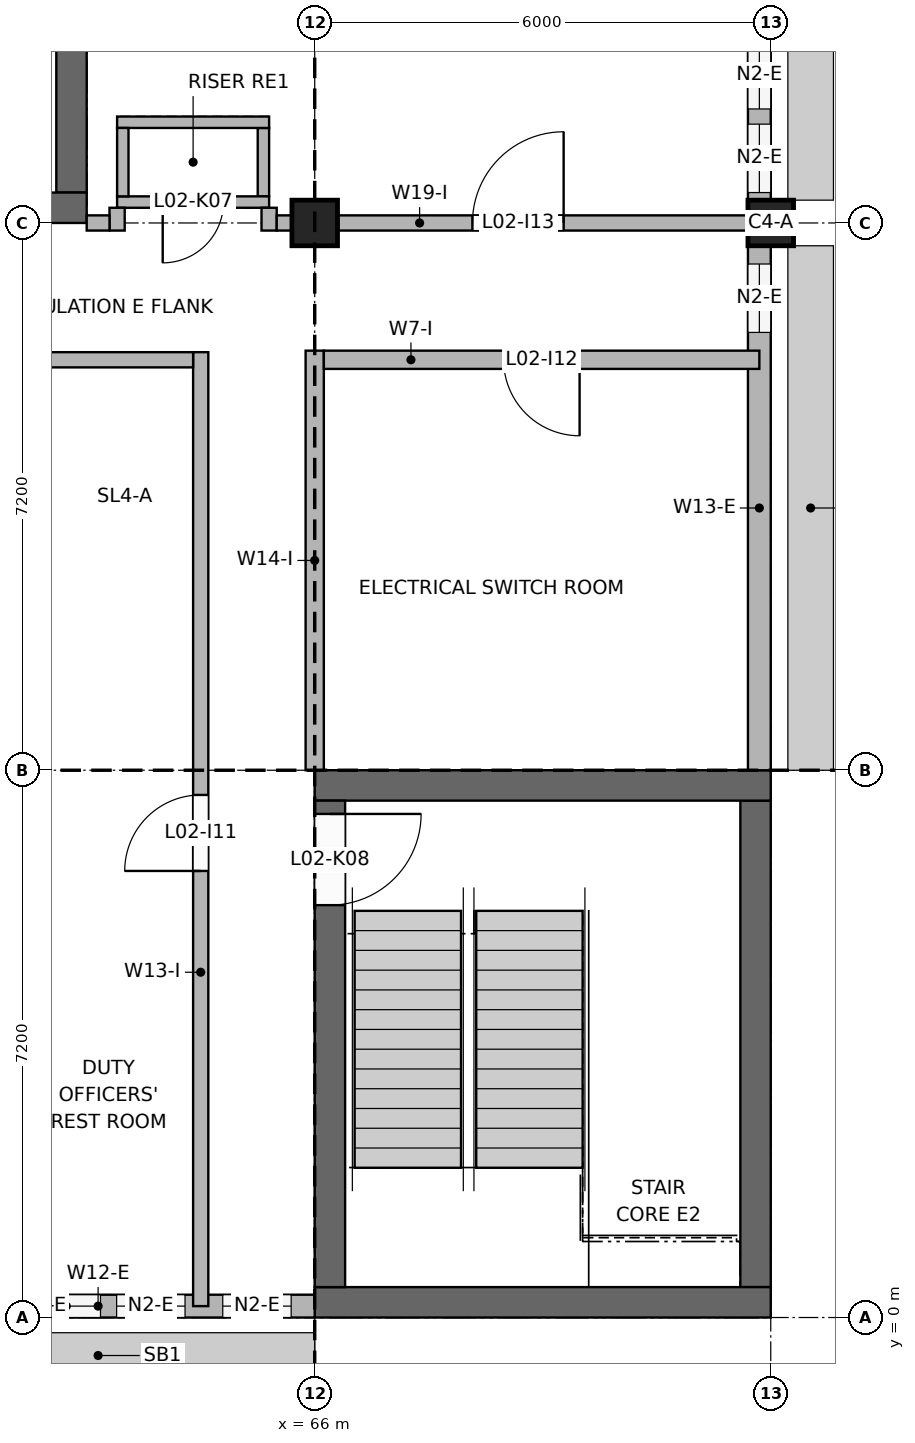
"""IFC4 building model, lengths in metres.
Left out: names, types, materials, properties, quantities, classifications, styles, units other than length and angle.
Written with IfcOpenShell. Run it as: python <this file> out.ifc"""

import sys

from ifc_helpers import new_model, si_unit, direction, frame, frame_2d, origin, origin_2d, place, context, subcontext, project, spatial, rectangle, extrude, element, fill, save


model = new_model("IFC4")
c1 = context("Model", 3, precision=1e-05, world=origin(), true_north=direction((0.0, 1.0)))
c2 = subcontext(c1, "Body", "Model", "MODEL_VIEW")
j1 = project(units=[si_unit("LENGTHUNIT", "METRE"), si_unit("PLANEANGLEUNIT", "RADIAN")], contexts=[c1])
p1 = place(None, origin())
s1 = spatial("IfcSite", under=j1, at=p1, CompositionType="ELEMENT")
p2 = place(p1, origin())
s2 = spatial("IfcBuilding", under=s1, at=p2, CompositionType="ELEMENT")
p3 = place(p2, frame((0.0, 0.0, 8.4)))
s3 = spatial("IfcBuildingStorey", under=s2, at=p3, CompositionType="ELEMENT", Elevation=8.4)
p4 = place(p3, frame((60.0, 14.6, 0.0), z_axis=(0.0, 0.0, 1.0), x_axis=(1.0, 0.0, 0.0)))
e1 = element("IfcWall", 1, at=p4, inside=s3, PredefinedType="SHEAR", context=c2, shape_type="SweptSolid", body=[
    extrude(rectangle(XDim=3.0, YDim=0.4, at=frame_2d((1.5, 0.0))), origin(), (0.0, 0.0, 1.0), 5.75),
])
p5 = place(p4, frame((0.95, 0.0, 0.0)))
e2 = element("IfcOpeningElement", 2, at=p5, cuts=e1, PredefinedType="OPENING", context=c2, shape_type="SweptSolid", body=[
    extrude(rectangle(XDim=1.1, YDim=2.1, at=frame_2d((0.55, 1.05))), frame((0.0, 0.21, 0.0), z_axis=(0.0, -1.0, 0.0), x_axis=(1.0, 0.0, 0.0)), (0.0, 0.0, 1.0), 0.42),
])
p6 = place(p3, frame((62.8, 14.8, 0.0), z_axis=(0.0, 0.0, 1.0), x_axis=(0.0, 1.0, 0.0)))
e3 = element("IfcWall", 3, at=p6, inside=s3, PredefinedType="SHEAR", context=c2, shape_type="SweptSolid", body=[
    extrude(rectangle(XDim=2.8, YDim=0.4, at=frame_2d((1.4, 0.0))), origin(), (0.0, 0.0, 1.0), 5.75),
])
for number, where, z_axis, x_axis in (
    (4, (66.0, 0.2, 0.0), (0.0, 0.0, 1.0), (1.0, 0.0, 0.0)),
    (5, (66.0, 7.0, 0.0), (0.0, 0.0, 1.0), (1.0, 0.0, 0.0)),
):
    element("IfcWall", number, at=place(p3, frame(where, z_axis=z_axis, x_axis=x_axis)), inside=s3, PredefinedType="SHEAR", context=c2, shape_type="SweptSolid", body=[
        extrude(rectangle(XDim=6.0, YDim=0.4, at=frame_2d((3.0, 0.0))), origin(), (0.0, 0.0, 1.0), 3.95),
    ])
p7 = place(p3, frame((66.2, 0.4, 0.0), z_axis=(0.0, 0.0, 1.0), x_axis=(0.0, 1.0, 0.0)))
e6 = element("IfcWall", 6, at=p7, inside=s3, PredefinedType="SHEAR", context=c2, shape_type="SweptSolid", body=[
    extrude(rectangle(XDim=6.4, YDim=0.4, at=frame_2d((3.2, 0.0))), origin(), (0.0, 0.0, 1.0), 3.95),
])
p8 = place(p7, frame((5.025, 0.0, 0.0)))
e7 = element("IfcOpeningElement", 7, at=p8, cuts=e6, PredefinedType="OPENING", context=c2, shape_type="SweptSolid", body=[
    extrude(rectangle(XDim=1.2, YDim=2.1, at=frame_2d((0.6, 1.05))), frame((0.0, 0.21, 0.0), z_axis=(0.0, -1.0, 0.0), x_axis=(1.0, 0.0, 0.0)), (0.0, 0.0, 1.0), 0.42),
])
p9 = place(p3, frame((71.8, 0.4, 0.0), z_axis=(0.0, 0.0, 1.0), x_axis=(0.0, 1.0, 0.0)))
e8 = element("IfcWall", 8, at=p9, inside=s3, PredefinedType="SHEAR", context=c2, shape_type="SweptSolid", body=[
    extrude(rectangle(XDim=6.4, YDim=0.4, at=frame_2d((3.2, 0.0))), origin(), (0.0, 0.0, 1.0), 3.95),
])
p10 = place(p3, frame((63.4, 14.675, 0.0), z_axis=(0.0, 0.0, 1.0), x_axis=(1.0, 0.0, 0.0)))
e9 = element("IfcWall", 9, at=p10, inside=s3, PredefinedType="SOLIDWALL", context=c2, shape_type="SweptSolid", body=[
    extrude(rectangle(XDim=2.0, YDim=0.15, at=frame_2d((1.0, 0.0))), origin(), (0.0, 0.0, 1.0), 3.95),
])
p11 = place(p10, frame((0.6, 0.0, 0.0)))
e10 = element("IfcOpeningElement", 10, at=p11, cuts=e9, PredefinedType="OPENING", context=c2, shape_type="SweptSolid", body=[
    extrude(rectangle(XDim=0.8, YDim=2.1, at=frame_2d((0.4, 1.05))), frame((0.0, 0.085, 0.0), z_axis=(0.0, -1.0, 0.0), x_axis=(1.0, 0.0, 0.0)), (0.0, 0.0, 1.0), 0.17),
])
p12 = place(p3, frame((63.4, 15.725, 0.0), z_axis=(0.0, 0.0, 1.0), x_axis=(1.0, 0.0, 0.0)))
e11 = element("IfcWall", 11, at=p12, inside=s3, PredefinedType="SOLIDWALL", context=c2, shape_type="SweptSolid", body=[
    extrude(rectangle(XDim=2.0, YDim=0.15, at=frame_2d((1.0, 0.0))), origin(), (0.0, 0.0, 1.0), 3.95),
])
for number, where, z_axis, x_axis in (
    (12, (63.475, 14.75, 0.0), (0.0, 0.0, 1.0), (0.0, 1.0, 0.0)),
    (13, (65.325, 14.75, 0.0), (0.0, 0.0, 1.0), (0.0, 1.0, 0.0)),
):
    element("IfcWall", number, at=place(p3, frame(where, z_axis=z_axis, x_axis=x_axis)), inside=s3, PredefinedType="SOLIDWALL", context=c2, shape_type="SweptSolid", body=[
        extrude(rectangle(XDim=0.9, YDim=0.15, at=frame_2d((0.45, 0.0))), origin(), (0.0, 0.0, 1.0), 3.95),
    ])
for number, where, z_axis, x_axis in (
    (14, (66.0, 14.4, 0.0), (0.0, 0.0, 1.0), (1.0, 0.0, 0.0)),
    (15, (72.0, 14.4, 0.0), (0.0, 0.0, 1.0), (1.0, 0.0, 0.0)),
):
    element("IfcColumn", number, at=place(p3, frame(where, z_axis=z_axis, x_axis=x_axis)), inside=s3, PredefinedType="COLUMN", context=c2, shape_type="SweptSolid", body=[
        extrude(rectangle(XDim=0.6, YDim=0.6, at=origin_2d()), origin(), (0.0, 0.0, 1.0), 3.95),
    ])
p13 = place(p3, frame((60.3, 0.15, 0.0), z_axis=(0.0, 0.0, 1.0), x_axis=(1.0, 0.0, 0.0)))
e16 = element("IfcWall", 16, at=p13, inside=s3, PredefinedType="SOLIDWALL", context=c2, shape_type="SweptSolid", body=[
    extrude(rectangle(XDim=5.7, YDim=0.3, at=frame_2d((2.85, 0.0))), origin(), (0.0, 0.0, 1.0), 3.15),
])
p14 = place(p13, frame((0.413, 0.0, 0.9)))
e17 = element("IfcOpeningElement", 17, at=p14, cuts=e16, PredefinedType="OPENING", context=c2, shape_type="SweptSolid", body=[
    extrude(rectangle(XDim=0.9, YDim=1.2, at=frame_2d((0.45, 0.6))), frame((0.0, 0.16, 0.0), z_axis=(0.0, -1.0, 0.0), x_axis=(1.0, 0.0, 0.0)), (0.0, 0.0, 1.0), 0.32),
])
p15 = place(p13, frame((1.981, 0.0, 0.9)))
e18 = element("IfcOpeningElement", 18, at=p15, cuts=e16, PredefinedType="OPENING", context=c2, shape_type="SweptSolid", body=[
    extrude(rectangle(XDim=0.9, YDim=1.2, at=frame_2d((0.45, 0.6))), frame((0.0, 0.16, 0.0), z_axis=(0.0, -1.0, 0.0), x_axis=(1.0, 0.0, 0.0)), (0.0, 0.0, 1.0), 0.32),
])
p16 = place(p13, frame((3.094, 0.0, 0.9)))
e19 = element("IfcOpeningElement", 19, at=p16, cuts=e16, PredefinedType="OPENING", context=c2, shape_type="SweptSolid", body=[
    extrude(rectangle(XDim=0.9, YDim=1.2, at=frame_2d((0.45, 0.6))), frame((0.0, 0.16, 0.0), z_axis=(0.0, -1.0, 0.0), x_axis=(1.0, 0.0, 0.0)), (0.0, 0.0, 1.0), 0.32),
])
p17 = place(p13, frame((4.49, 0.0, 0.9)))
e20 = element("IfcOpeningElement", 20, at=p17, cuts=e16, PredefinedType="OPENING", context=c2, shape_type="SweptSolid", body=[
    extrude(rectangle(XDim=0.9, YDim=1.2, at=frame_2d((0.45, 0.6))), frame((0.0, 0.16, 0.0), z_axis=(0.0, -1.0, 0.0), x_axis=(1.0, 0.0, 0.0)), (0.0, 0.0, 1.0), 0.32),
])
p18 = place(p3, frame((71.85, 7.2, 0.0), z_axis=(0.0, 0.0, 1.0), x_axis=(0.0, 1.0, 0.0)))
e21 = element("IfcWall", 21, at=p18, inside=s3, PredefinedType="SOLIDWALL", context=c2, shape_type="SweptSolid", body=[
    extrude(rectangle(XDim=6.9, YDim=0.3, at=frame_2d((3.45, 0.0))), origin(), (0.0, 0.0, 1.0), 3.05),
])
p19 = place(p18, frame((5.76, 0.0, 0.9)))
e22 = element("IfcOpeningElement", 22, at=p19, cuts=e21, PredefinedType="OPENING", context=c2, shape_type="SweptSolid", body=[
    extrude(rectangle(XDim=0.9, YDim=1.2, at=frame_2d((0.45, 0.6))), frame((0.0, 0.16, 0.0), z_axis=(0.0, -1.0, 0.0), x_axis=(1.0, 0.0, 0.0)), (0.0, 0.0, 1.0), 0.32),
])
p20 = place(p3, frame((71.85, 14.7, 0.0), z_axis=(0.0, 0.0, 1.0), x_axis=(0.0, 1.0, 0.0)))
e23 = element("IfcWall", 23, at=p20, inside=s3, PredefinedType="SOLIDWALL", context=c2, shape_type="SweptSolid", body=[
    extrude(rectangle(XDim=6.6, YDim=0.3, at=frame_2d((3.3, 0.0))), origin(), (0.0, 0.0, 1.0), 3.05),
])
p21 = place(p20, frame((0.1, 0.0, 0.9)))
e24 = element("IfcOpeningElement", 24, at=p21, cuts=e23, PredefinedType="OPENING", context=c2, shape_type="SweptSolid", body=[
    extrude(rectangle(XDim=0.9, YDim=1.2, at=frame_2d((0.45, 0.6))), frame((0.0, 0.16, 0.0), z_axis=(0.0, -1.0, 0.0), x_axis=(1.0, 0.0, 0.0)), (0.0, 0.0, 1.0), 0.32),
])
p22 = place(p20, frame((1.2, 0.0, 0.9)))
e25 = element("IfcOpeningElement", 25, at=p22, cuts=e23, PredefinedType="OPENING", context=c2, shape_type="SweptSolid", body=[
    extrude(rectangle(XDim=0.9, YDim=1.2, at=frame_2d((0.45, 0.6))), frame((0.0, 0.16, 0.0), z_axis=(0.0, -1.0, 0.0), x_axis=(1.0, 0.0, 0.0)), (0.0, 0.0, 1.0), 0.32),
])
p23 = place(p20, frame((2.3, 0.0, 0.9)))
e26 = element("IfcOpeningElement", 26, at=p23, cuts=e23, PredefinedType="OPENING", context=c2, shape_type="SweptSolid", body=[
    extrude(rectangle(XDim=0.9, YDim=1.2, at=frame_2d((0.45, 0.6))), frame((0.0, 0.16, 0.0), z_axis=(0.0, -1.0, 0.0), x_axis=(1.0, 0.0, 0.0)), (0.0, 0.0, 1.0), 0.32),
])
p24 = place(p20, frame((3.4, 0.0, 0.9)))
e27 = element("IfcOpeningElement", 27, at=p24, cuts=e23, PredefinedType="OPENING", context=c2, shape_type="SweptSolid", body=[
    extrude(rectangle(XDim=0.9, YDim=1.2, at=frame_2d((0.45, 0.6))), frame((0.0, 0.16, 0.0), z_axis=(0.0, -1.0, 0.0), x_axis=(1.0, 0.0, 0.0)), (0.0, 0.0, 1.0), 0.32),
])
p25 = place(p20, frame((4.5, 0.0, 0.9)))
e28 = element("IfcOpeningElement", 28, at=p25, cuts=e23, PredefinedType="OPENING", context=c2, shape_type="SweptSolid", body=[
    extrude(rectangle(XDim=0.9, YDim=1.2, at=frame_2d((0.45, 0.6))), frame((0.0, 0.16, 0.0), z_axis=(0.0, -1.0, 0.0), x_axis=(1.0, 0.0, 0.0)), (0.0, 0.0, 1.0), 0.32),
])
p26 = place(p20, frame((5.6, 0.0, 0.9)))
e29 = element("IfcOpeningElement", 29, at=p26, cuts=e23, PredefinedType="OPENING", context=c2, shape_type="SweptSolid", body=[
    extrude(rectangle(XDim=0.9, YDim=1.2, at=frame_2d((0.45, 0.6))), frame((0.0, 0.16, 0.0), z_axis=(0.0, -1.0, 0.0), x_axis=(1.0, 0.0, 0.0)), (0.0, 0.0, 1.0), 0.32),
])
p27 = place(p3, frame((63.4, 14.3, 0.0), z_axis=(0.0, 0.0, 1.0), x_axis=(0.0, 1.0, 0.0)))
e30 = element("IfcWall", 30, at=p27, inside=s3, PredefinedType="PARTITIONING", context=c2, shape_type="SweptSolid", body=[
    extrude(rectangle(XDim=0.3, YDim=0.2, at=frame_2d((0.15, 0.0))), origin(), (0.0, 0.0, 1.0), 3.25),
])
p28 = place(p3, frame((64.5, 0.15, 0.0), z_axis=(0.0, 0.0, 1.0), x_axis=(0.0, 1.0, 0.0)))
e31 = element("IfcWall", 31, at=p28, inside=s3, PredefinedType="PARTITIONING", context=c2, shape_type="SweptSolid", body=[
    extrude(rectangle(XDim=12.55, YDim=0.2, at=frame_2d((6.275, 0.0))), origin(), (0.0, 0.0, 1.0), 3.15),
])
p29 = place(p28, frame((5.725, 0.0, 0.0)))
e32 = element("IfcOpeningElement", 32, at=p29, cuts=e31, PredefinedType="OPENING", context=c2, shape_type="SweptSolid", body=[
    extrude(rectangle(XDim=1.0, YDim=2.1, at=frame_2d((0.5, 1.05))), frame((0.0, 0.11, 0.0), z_axis=(0.0, -1.0, 0.0), x_axis=(1.0, 0.0, 0.0)), (0.0, 0.0, 1.0), 0.22),
])
p30 = place(p3, frame((65.4, 14.3, 0.0), z_axis=(0.0, 0.0, 1.0), x_axis=(0.0, 1.0, 0.0)))
e33 = element("IfcWall", 33, at=p30, inside=s3, PredefinedType="PARTITIONING", context=c2, shape_type="SweptSolid", body=[
    extrude(rectangle(XDim=0.3, YDim=0.2, at=frame_2d((0.15, 0.0))), origin(), (0.0, 0.0, 1.0), 3.25),
])
p31 = place(p3, frame((66.0, 7.2, 0.0), z_axis=(0.0, 0.0, 1.0), x_axis=(0.0, 1.0, 0.0)))
e34 = element("IfcWall", 34, at=p31, inside=s3, PredefinedType="PARTITIONING", context=c2, shape_type="SweptSolid", body=[
    extrude(rectangle(XDim=5.52, YDim=0.24, at=frame_2d((2.76, 0.0))), origin(), (0.0, 0.0, 1.0), 3.15),
])
p32 = place(p3, frame((55.15, 12.6, 0.0), z_axis=(0.0, 0.0, 1.0), x_axis=(1.0, 0.0, 0.0)))
e35 = element("IfcWall", 35, at=p32, inside=s3, PredefinedType="PARTITIONING", context=c2, shape_type="SweptSolid", body=[
    extrude(rectangle(XDim=9.25, YDim=0.2, at=frame_2d((4.625, 0.0))), origin(), (0.0, 0.0, 1.0), 3.15),
])
p33 = place(p32, frame((1.325, 0.0, 0.0)))
e36 = element("IfcOpeningElement", 36, at=p33, cuts=e35, PredefinedType="OPENING", context=c2, shape_type="SweptSolid", body=[
    extrude(rectangle(XDim=1.2, YDim=2.1, at=frame_2d((0.6, 1.05))), frame((0.0, 0.11, 0.0), z_axis=(0.0, -1.0, 0.0), x_axis=(1.0, 0.0, 0.0)), (0.0, 0.0, 1.0), 0.22),
])
p34 = place(p32, frame((4.8, 0.0, 0.0)))
e37 = element("IfcOpeningElement", 37, at=p34, cuts=e35, PredefinedType="OPENING", context=c2, shape_type="SweptSolid", body=[
    extrude(rectangle(XDim=1.2, YDim=2.1, at=frame_2d((0.6, 1.05))), frame((0.0, 0.11, 0.0), z_axis=(0.0, -1.0, 0.0), x_axis=(1.0, 0.0, 0.0)), (0.0, 0.0, 1.0), 0.22),
])
p35 = place(p3, frame((66.12, 12.6, 0.0), z_axis=(0.0, 0.0, 1.0), x_axis=(1.0, 0.0, 0.0)))
e38 = element("IfcWall", 38, at=p35, inside=s3, PredefinedType="PARTITIONING", context=c2, shape_type="SweptSolid", body=[
    extrude(rectangle(XDim=5.73, YDim=0.24, at=frame_2d((2.865, 0.0))), origin(), (0.0, 0.0, 1.0), 3.05),
])
p36 = place(p35, frame((2.365, 0.0, 0.0)))
e39 = element("IfcOpeningElement", 39, at=p36, cuts=e38, PredefinedType="OPENING", context=c2, shape_type="SweptSolid", body=[
    extrude(rectangle(XDim=1.0, YDim=2.1, at=frame_2d((0.5, 1.05))), frame((0.0, 0.13, 0.0), z_axis=(0.0, -1.0, 0.0), x_axis=(1.0, 0.0, 0.0)), (0.0, 0.0, 1.0), 0.26),
])
p37 = place(p3, frame((63.0, 14.4, 0.0), z_axis=(0.0, 0.0, 1.0), x_axis=(1.0, 0.0, 0.0)))
e40 = element("IfcWall", 40, at=p37, inside=s3, PredefinedType="PARTITIONING", context=c2, shape_type="SweptSolid", body=[
    extrude(rectangle(XDim=0.3, YDim=0.2, at=frame_2d((0.15, 0.0))), origin(), (0.0, 0.0, 1.0), 3.25),
])
p38 = place(p3, frame((65.5, 14.4, 0.0), z_axis=(0.0, 0.0, 1.0), x_axis=(1.0, 0.0, 0.0)))
e41 = element("IfcWall", 41, at=p38, inside=s3, PredefinedType="PARTITIONING", context=c2, shape_type="SweptSolid", body=[
    extrude(rectangle(XDim=0.2, YDim=0.2, at=frame_2d((0.1, 0.0))), origin(), (0.0, 0.0, 1.0), 3.25),
])
p39 = place(p3, frame((66.3, 14.4, 0.0), z_axis=(0.0, 0.0, 1.0), x_axis=(1.0, 0.0, 0.0)))
e42 = element("IfcWall", 42, at=p39, inside=s3, PredefinedType="PARTITIONING", context=c2, shape_type="SweptSolid", body=[
    extrude(rectangle(XDim=5.4, YDim=0.2, at=frame_2d((2.7, 0.0))), origin(), (0.0, 0.0, 1.0), 3.25),
])
p40 = place(p39, frame((1.775, 0.0, 0.0)))
e43 = element("IfcOpeningElement", 43, at=p40, cuts=e42, PredefinedType="OPENING", context=c2, shape_type="SweptSolid", body=[
    extrude(rectangle(XDim=1.2, YDim=2.1, at=frame_2d((0.6, 1.05))), frame((0.0, 0.11, 0.0), z_axis=(0.0, -1.0, 0.0), x_axis=(1.0, 0.0, 0.0)), (0.0, 0.0, 1.0), 0.22),
])
p41 = place(p15, origin())
e44 = element("IfcWindow", 44, at=p41, inside=s3, PartitioningType="SINGLE_PANEL", PredefinedType="WINDOW", context=c2, shape_type="SweptSolid", body=[
    extrude(rectangle(XDim=0.9, YDim=1.2, at=frame_2d((0.45, 0.6))), frame((0.0, 0.03, 0.0), z_axis=(0.0, -1.0, 0.0), x_axis=(1.0, 0.0, 0.0)), (0.0, 0.0, 1.0), 0.06),
])
fill(e18, e44)
p42 = place(p16, origin())
e45 = element("IfcWindow", 45, at=p42, inside=s3, PartitioningType="SINGLE_PANEL", PredefinedType="WINDOW", context=c2, shape_type="SweptSolid", body=[
    extrude(rectangle(XDim=0.9, YDim=1.2, at=frame_2d((0.45, 0.6))), frame((0.0, 0.03, 0.0), z_axis=(0.0, -1.0, 0.0), x_axis=(1.0, 0.0, 0.0)), (0.0, 0.0, 1.0), 0.06),
])
fill(e19, e45)
p43 = place(p17, origin())
e46 = element("IfcWindow", 46, at=p43, inside=s3, PartitioningType="SINGLE_PANEL", PredefinedType="WINDOW", context=c2, shape_type="SweptSolid", body=[
    extrude(rectangle(XDim=0.9, YDim=1.2, at=frame_2d((0.45, 0.6))), frame((0.0, 0.03, 0.0), z_axis=(0.0, -1.0, 0.0), x_axis=(1.0, 0.0, 0.0)), (0.0, 0.0, 1.0), 0.06),
])
fill(e20, e46)
p44 = place(p19, origin())
e47 = element("IfcWindow", 47, at=p44, inside=s3, PartitioningType="SINGLE_PANEL", PredefinedType="WINDOW", context=c2, shape_type="SweptSolid", body=[
    extrude(rectangle(XDim=0.9, YDim=1.2, at=frame_2d((0.45, 0.6))), frame((0.0, 0.03, 0.0), z_axis=(0.0, -1.0, 0.0), x_axis=(1.0, 0.0, 0.0)), (0.0, 0.0, 1.0), 0.06),
])
fill(e22, e47)
p45 = place(p21, origin())
e48 = element("IfcWindow", 48, at=p45, inside=s3, PartitioningType="SINGLE_PANEL", PredefinedType="WINDOW", context=c2, shape_type="SweptSolid", body=[
    extrude(rectangle(XDim=0.9, YDim=1.2, at=frame_2d((0.45, 0.6))), frame((0.0, 0.03, 0.0), z_axis=(0.0, -1.0, 0.0), x_axis=(1.0, 0.0, 0.0)), (0.0, 0.0, 1.0), 0.06),
])
fill(e24, e48)
p46 = place(p22, origin())
e49 = element("IfcWindow", 49, at=p46, inside=s3, PartitioningType="SINGLE_PANEL", PredefinedType="WINDOW", context=c2, shape_type="SweptSolid", body=[
    extrude(rectangle(XDim=0.9, YDim=1.2, at=frame_2d((0.45, 0.6))), frame((0.0, 0.03, 0.0), z_axis=(0.0, -1.0, 0.0), x_axis=(1.0, 0.0, 0.0)), (0.0, 0.0, 1.0), 0.06),
])
fill(e25, e49)
p47 = place(p11, frame((0.8, 0.0, 0.0), z_axis=(0.0, 0.0, 1.0), x_axis=(-1.0, 0.0, 0.0)))
e50 = element("IfcDoor", 50, at=p47, inside=s3, OperationType="SINGLE_SWING_RIGHT", PredefinedType="DOOR", context=c2, shape_type="SweptSolid", body=[
    extrude(rectangle(XDim=0.8, YDim=2.1, at=frame_2d((0.4, 1.05))), frame((0.0, 0.025, 0.0), z_axis=(0.0, -1.0, 0.0), x_axis=(1.0, 0.0, 0.0)), (0.0, 0.0, 1.0), 0.05),
])
fill(e10, e50)
p48 = place(p8, frame((1.2, 0.0, 0.0), z_axis=(0.0, 0.0, 1.0), x_axis=(-1.0, 0.0, 0.0)))
e51 = element("IfcDoor", 51, at=p48, inside=s3, OperationType="SINGLE_SWING_LEFT", PredefinedType="DOOR", context=c2, shape_type="SweptSolid", body=[
    extrude(rectangle(XDim=1.2, YDim=2.1, at=frame_2d((0.6, 1.05))), frame((0.0, 0.025, 0.0), z_axis=(0.0, -1.0, 0.0), x_axis=(1.0, 0.0, 0.0)), (0.0, 0.0, 1.0), 0.05),
])
fill(e7, e51)
p49 = place(p29, origin())
e52 = element("IfcDoor", 52, at=p49, inside=s3, OperationType="SINGLE_SWING_LEFT", PredefinedType="DOOR", context=c2, shape_type="SweptSolid", body=[
    extrude(rectangle(XDim=1.0, YDim=2.1, at=frame_2d((0.5, 1.05))), frame((0.0, 0.025, 0.0), z_axis=(0.0, -1.0, 0.0), x_axis=(1.0, 0.0, 0.0)), (0.0, 0.0, 1.0), 0.05),
])
fill(e32, e52)
p50 = place(p36, frame((1.0, 0.0, 0.0), z_axis=(0.0, 0.0, 1.0), x_axis=(-1.0, 0.0, 0.0)))
e53 = element("IfcDoor", 53, at=p50, inside=s3, OperationType="SINGLE_SWING_LEFT", PredefinedType="DOOR", context=c2, shape_type="SweptSolid", body=[
    extrude(rectangle(XDim=1.0, YDim=2.1, at=frame_2d((0.5, 1.05))), frame((0.0, 0.025, 0.0), z_axis=(0.0, -1.0, 0.0), x_axis=(1.0, 0.0, 0.0)), (0.0, 0.0, 1.0), 0.05),
])
fill(e39, e53)
p51 = place(p40, origin())
e54 = element("IfcDoor", 54, at=p51, inside=s3, OperationType="SINGLE_SWING_RIGHT", PredefinedType="DOOR", context=c2, shape_type="SweptSolid", body=[
    extrude(rectangle(XDim=1.2, YDim=2.1, at=frame_2d((0.6, 1.05))), frame((0.0, 0.025, 0.0), z_axis=(0.0, -1.0, 0.0), x_axis=(1.0, 0.0, 0.0)), (0.0, 0.0, 1.0), 0.05),
])
fill(e43, e54)
save(model, sys.argv[1])
